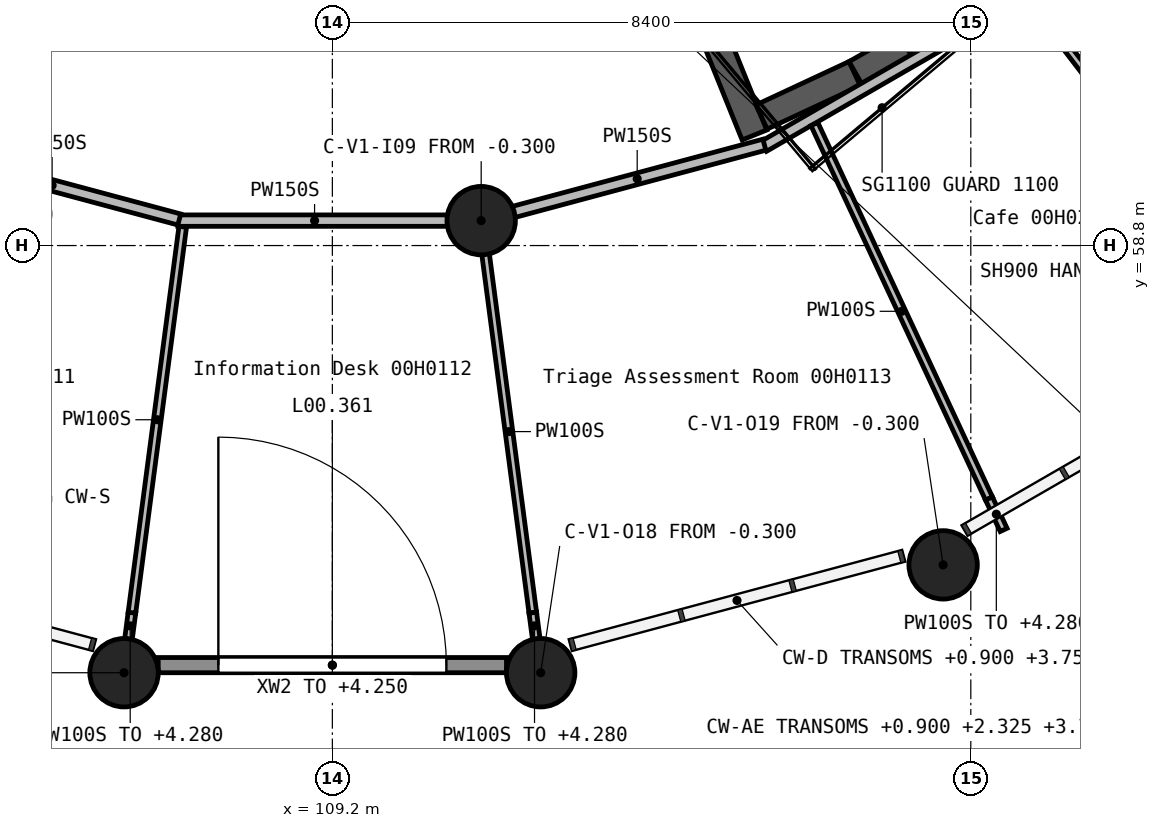
"""IFC4 building model, lengths in metres.
Left out: names, types, materials, properties, quantities, classifications, styles, units other than length and angle.
Written with IfcOpenShell. Run it as: python <this file> out.ifc"""

import sys

from ifc_helpers import new_model, si_unit, direction, frame, frame_2d, origin, origin_2d, place, context, subcontext, project, spatial, rectangle, circle, extrude, element, fill, save


model = new_model("IFC4")
c1 = context("Model", 3, precision=1e-05, world=origin(), true_north=direction((0.0, 1.0)))
c2 = subcontext(c1, "Body", "Model", "MODEL_VIEW")
j1 = project(units=[si_unit("LENGTHUNIT", "METRE"), si_unit("PLANEANGLEUNIT", "RADIAN")], contexts=[c1])
p1 = place(None, origin())
s1 = spatial("IfcSite", under=j1, at=p1, CompositionType="ELEMENT")
p2 = place(p1, origin())
s2 = spatial("IfcBuilding", under=s1, at=p2, CompositionType="ELEMENT")
p3 = place(p2, origin())
s3 = spatial("IfcBuildingStorey", under=s2, at=p3, CompositionType="ELEMENT", Elevation=0.0)
for number, where, z_axis, x_axis in (
    (1, (106.459, 53.18, -0.3), (0.0, 0.0, 1.0), (1.0, 0.0, 0.0)),
    (2, (111.158, 59.128, -0.3), (0.0, 0.0, 1.0), (1.0, 0.0, 0.0)),
    (3, (111.941, 53.18, -0.3), (0.0, 0.0, 1.0), (1.0, 0.0, 0.0)),
    (4, (117.236, 54.599, -0.3), (0.0, 0.0, 1.0), (1.0, 0.0, 0.0)),
):
    element("IfcColumn", number, at=place(p3, frame(where, z_axis=z_axis, x_axis=x_axis)), inside=s3, PredefinedType="COLUMN", context=c2, shape_type="SweptSolid", body=[
        extrude(circle(Radius=0.45, at=origin_2d()), origin(), (0.0, 0.0, 1.0), 5.7),
    ])
p4 = place(p3, frame((111.569, 68.135, -0.3), z_axis=(0.0, 0.0, 1.0), x_axis=(0.374642087999, -0.927169513034, 0.0)))
e5 = element("IfcWall", 5, at=p4, inside=s3, PredefinedType="SHEAR", context=c2, shape_type="SweptSolid", body=[
    extrude(rectangle(XDim=8.5, YDim=0.35, at=frame_2d((4.25, 0.0))), origin(), (0.0, 0.0, 1.0), 5.7),
])
p5 = place(p3, frame((114.847, 60.491, -0.3), z_axis=(0.0, 0.0, 1.0), x_axis=(0.906372243269, 0.422480007375, 0.0)))
e6 = element("IfcWall", 6, at=p5, inside=s3, PredefinedType="SHEAR", context=c2, shape_type="SweptSolid", body=[
    extrude(rectangle(XDim=1.352, YDim=0.35, at=frame_2d((0.676, 0.0))), origin(), (0.0, 0.0, 1.0), 5.7),
])
p6 = place(p3, frame((116.084, 61.068, -0.3), z_axis=(0.0, 0.0, 1.0), x_axis=(0.870629311114, 0.491939633115, 0.0)))
e7 = element("IfcWall", 7, at=p6, inside=s3, PredefinedType="SHEAR", context=c2, shape_type="SweptSolid", body=[
    extrude(rectangle(XDim=0.752, YDim=0.35, at=frame_2d((0.376, 0.0))), origin(), (0.0, 0.0, 1.0), 5.7),
])
p7 = place(p3, frame((116.751, 61.446, -0.3), z_axis=(0.0, 0.0, 1.0), x_axis=(0.828999419692, 0.559249463255, 0.0)))
e8 = element("IfcWall", 8, at=p7, inside=s3, PredefinedType="SHEAR", context=c2, shape_type="SweptSolid", body=[
    extrude(rectangle(XDim=1.521, YDim=0.35, at=frame_2d((0.76, 0.0))), origin(), (0.0, 0.0, 1.0), 5.7),
])
p8 = place(p3, frame((106.909, 53.28, 0.0), z_axis=(0.0, 0.0, 1.0), x_axis=(1.0, 0.0, 0.0)))
e9 = element("IfcWall", 9, at=p8, inside=s3, PredefinedType="STANDARD", context=c2, shape_type="SweptSolid", body=[
    extrude(rectangle(XDim=4.582, YDim=0.2, at=frame_2d((2.291, 0.0))), origin(), (0.0, 0.0, 1.0), 4.25),
])
p9 = place(p8, frame((0.791, 0.0, 0.0)))
e10 = element("IfcOpeningElement", 10, at=p9, cuts=e9, PredefinedType="OPENING", context=c2, shape_type="SweptSolid", body=[
    extrude(rectangle(XDim=3.0, YDim=2.4, at=frame_2d((1.5, 1.2))), frame((0.0, 0.11, 0.0), z_axis=(0.0, -1.0, 0.0), x_axis=(1.0, 0.0, 0.0)), (0.0, 0.0, 1.0), 0.22),
])
for number, where, z_axis, x_axis in (
    (11, (107.167, 59.128, 0.0), (0.0, 0.0, 1.0), (1.0, 0.0, 0.0)),
    (12, (114.875, 60.104, 0.0), (0.0, 0.0, 1.0), (0.866, 0.5, 0.0)),
):
    element("IfcWall", number, at=place(p3, frame(where, z_axis=z_axis, x_axis=x_axis)), inside=s3, PredefinedType="PARTITIONING", context=c2, shape_type="SweptSolid", body=[
        extrude(rectangle(XDim=3.598, YDim=0.15, at=frame_2d((1.799, 0.0))), origin(), (0.0, 0.0, 1.0), 5.05),
    ])
for number, where, z_axis, x_axis in (
    (13, (103.84, 60.04, 0.0), (0.0, 0.0, 1.0), (0.966, -0.259, 0.0)),
    (14, (111.538, 59.23, 0.0), (0.0, 0.0, 1.0), (0.966, 0.259, 0.0)),
):
    element("IfcWall", number, at=place(p3, frame(where, z_axis=z_axis, x_axis=x_axis)), inside=s3, PredefinedType="PARTITIONING", context=c2, shape_type="SweptSolid", body=[
        extrude(rectangle(XDim=3.465, YDim=0.15, at=frame_2d((1.732, 0.0))), origin(), (0.0, 0.0, 1.0), 5.05),
    ])
p10 = place(p3, frame((118.573, 61.785, 0.0), z_axis=(0.0, 0.0, 1.0), x_axis=(0.608821758803, -0.793307043967, 0.0)))
e15 = element("IfcWall", 15, at=p10, inside=s3, PredefinedType="PARTITIONING", context=c2, shape_type="SweptSolid", body=[
    extrude(rectangle(XDim=4.806, YDim=0.1, at=frame_2d((2.403, 0.0))), origin(), (0.0, 0.0, 1.0), 5.05),
])
p11 = place(p3, frame((106.517, 53.623, 0.0), z_axis=(0.0, 0.0, 1.0), x_axis=(0.13038236842, 0.991463785524, 0.0)))
e16 = element("IfcWall", 16, at=p11, inside=s3, PredefinedType="PARTITIONING", context=c2, shape_type="SweptSolid", body=[
    extrude(rectangle(XDim=0.35, YDim=0.1, at=frame_2d((0.175, 0.0))), origin(), (0.0, 0.0, 1.0), 4.28),
])
p12 = place(p3, frame((106.563, 53.97, 0.0), z_axis=(0.0, 0.0, 1.0), x_axis=(0.130505083023, 0.991447640224, 0.0)))
e17 = element("IfcWall", 17, at=p12, inside=s3, PredefinedType="PARTITIONING", context=c2, shape_type="SweptSolid", body=[
    extrude(rectangle(XDim=5.12, YDim=0.1, at=frame_2d((2.56, 0.0))), origin(), (0.0, 0.0, 1.0), 5.05),
])
p13 = place(p3, frame((111.21, 58.735, 0.0), z_axis=(0.0, 0.0, 1.0), x_axis=(0.130516279849, -0.991446166312, 0.0)))
e18 = element("IfcWall", 18, at=p13, inside=s3, PredefinedType="PARTITIONING", context=c2, shape_type="SweptSolid", body=[
    extrude(rectangle(XDim=4.805, YDim=0.1, at=frame_2d((2.403, 0.0))), origin(), (0.0, 0.0, 1.0), 5.05),
])
p14 = place(p3, frame((111.837, 53.97, 0.0), z_axis=(0.0, 0.0, 1.0), x_axis=(0.131067654089, -0.991373426138, 0.0)))
e19 = element("IfcWall", 19, at=p14, inside=s3, PredefinedType="PARTITIONING", context=c2, shape_type="SweptSolid", body=[
    extrude(rectangle(XDim=0.35, YDim=0.1, at=frame_2d((0.175, 0.0))), origin(), (0.0, 0.0, 1.0), 4.28),
])
p15 = place(p3, frame((115.542, 60.398, 0.0), z_axis=(0.0, 0.0, 1.0), x_axis=(0.422649401767, -0.906293265553, 0.0)))
e20 = element("IfcWall", 20, at=p15, inside=s3, PredefinedType="PARTITIONING", context=c2, shape_type="SweptSolid", body=[
    extrude(rectangle(XDim=5.436, YDim=0.1, at=frame_2d((2.718, 0.0))), origin(), (0.0, 0.0, 1.0), 5.05),
])
p16 = place(p3, frame((117.84, 55.472, 0.0), z_axis=(0.0, 0.0, 1.0), x_axis=(0.422386547232, -0.906415801229, 0.0)))
e21 = element("IfcWall", 21, at=p16, inside=s3, PredefinedType="PARTITIONING", context=c2, shape_type="SweptSolid", body=[
    extrude(rectangle(XDim=0.456, YDim=0.1, at=frame_2d((0.228, 0.0))), origin(), (0.0, 0.0, 1.0), 4.28),
])
p17 = place(p9, frame((3.0, 0.0, 0.0), z_axis=(0.0, 0.0, 1.0), x_axis=(-1.0, 0.0, 0.0)))
e22 = element("IfcDoor", 22, at=p17, inside=s3, OperationType="SINGLE_SWING_LEFT", PredefinedType="DOOR", context=c2, shape_type="SweptSolid", body=[
    extrude(rectangle(XDim=3.0, YDim=2.4, at=frame_2d((1.5, 1.2))), frame((0.0, 0.025, 0.0), z_axis=(0.0, -1.0, 0.0), x_axis=(1.0, 0.0, 0.0)), (0.0, 0.0, 1.0), 0.05),
])
fill(e10, e22)
save(model, sys.argv[1])
